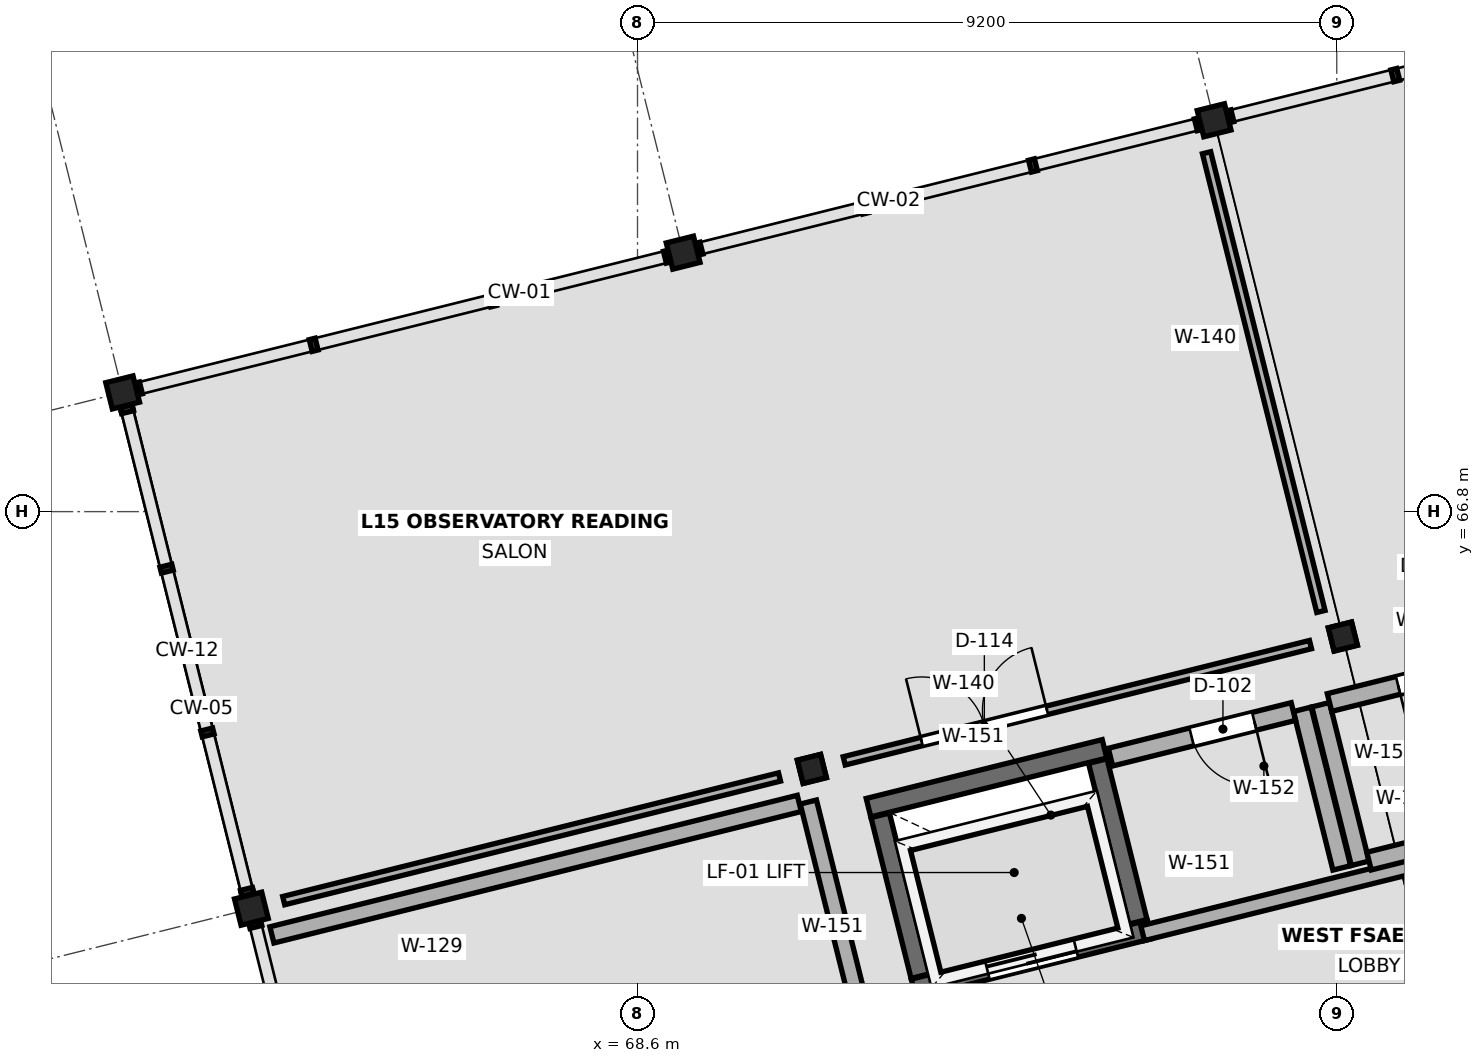
"""IFC4 building model, lengths in metres.
Left out: names, types, materials, properties, quantities, classifications, styles, units other than length and angle.
Written with IfcOpenShell. Run it as: python <this file> out.ifc"""

import sys

from ifc_helpers import new_model, si_unit, direction, frame, frame_2d, origin, origin_2d, place, context, subcontext, project, spatial, rectangle, i_section, extrude, element, fill, save


model = new_model("IFC4")
c1 = context("Model", 3, precision=1e-05, world=origin(), true_north=direction((0.0, 1.0)))
c2 = subcontext(c1, "Body", "Model", "MODEL_VIEW")
j1 = project(units=[si_unit("LENGTHUNIT", "METRE"), si_unit("PLANEANGLEUNIT", "RADIAN")], contexts=[c1])
p1 = place(None, origin())
s1 = spatial("IfcSite", under=j1, at=p1, CompositionType="ELEMENT")
p2 = place(p1, origin())
s2 = spatial("IfcBuilding", under=s1, at=p2, CompositionType="ELEMENT")
p3 = place(p2, frame((0.0, 0.0, 61.2)))
s3 = spatial("IfcBuildingStorey", under=s2, at=p3, CompositionType="ELEMENT", Elevation=61.2)
for number, where, z_axis, x_axis in (
    (1, (63.52, 61.576, 0.0), (0.0, 0.0, 1.0), (0.97, 0.242, 0.0)),
    (2, (61.826, 68.368, 0.0), (0.0, 0.0, 1.0), (0.97, 0.242, 0.0)),
    (3, (70.894, 63.415, 0.0), (0.0, 0.0, 1.0), (0.97, 0.242, 0.0)),
    (4, (69.2, 70.207, 0.0), (0.0, 0.0, 1.0), (0.97, 0.242, 0.0)),
    (5, (77.88, 65.157, 0.0), (0.0, 0.0, 1.0), (0.97, 0.242, 0.0)),
    (6, (76.187, 71.949, 0.0), (0.0, 0.0, 1.0), (0.97, 0.242, 0.0)),
):
    element("IfcColumn", number, at=place(p3, frame(where, z_axis=z_axis, x_axis=x_axis)), inside=s3, PredefinedType="COLUMN", context=c2, shape_type="SweptSolid", body=[
        extrude(rectangle(XDim=0.315, YDim=0.315, at=origin_2d()), origin(), (0.0, 0.0, 1.0), 4.2),
    ])
p4 = place(p3, frame((70.894, 63.415, 4.2), z_axis=(0.0, 0.0, 1.0), x_axis=(0.970295726276, 0.2419218956, 0.0)))
e7 = element("IfcColumn", 7, at=p4, inside=s3, PredefinedType="COLUMN", context=c2, shape_type="SweptSolid", body=[
    extrude(rectangle(XDim=0.315, YDim=0.315, at=origin_2d()), origin(), (0.0, 0.0, 1.0), 1.81),
])
p5 = place(p3, frame((77.88, 65.157, 4.2), z_axis=(0.0, 0.0, 1.0), x_axis=(0.970295726276, 0.2419218956, 0.0)))
e8 = element("IfcColumn", 8, at=p5, inside=s3, PredefinedType="COLUMN", context=c2, shape_type="SweptSolid", body=[
    extrude(rectangle(XDim=0.315, YDim=0.315, at=origin_2d()), origin(), (0.0, 0.0, 1.0), 3.804),
])
for number, where, z_axis, x_axis in (
    (9, (76.187, 71.949, 4.2), (0.0, 0.0, 1.0), (0.97, 0.242, 0.0)),
    (10, (69.2, 70.207, 4.2), (0.0, 0.0, 1.0), (0.97, 0.242, 0.0)),
    (11, (61.826, 68.368, 4.2), (0.0, 0.0, 1.0), (0.97, 0.242, 0.0)),
    (12, (63.52, 61.576, 4.2), (0.0, 0.0, 1.0), (0.97, 0.242, 0.0)),
):
    element("IfcColumn", number, at=place(p3, frame(where, z_axis=z_axis, x_axis=x_axis)), inside=s3, PredefinedType="COLUMN", context=c2, shape_type="SweptSolid", body=[
        extrude(i_section(OverallWidth=0.369, OverallDepth=0.356, WebThickness=0.011, FlangeThickness=0.018, at=origin_2d()), origin(), (0.0, 0.0, 1.0), 4.8),
    ])
p6 = place(p3, frame((74.744, 63.679, 0.0), z_axis=(0.0, 0.0, 1.0), x_axis=(-0.970294894235, -0.241925232711, 0.0)))
e13 = element("IfcWall", 13, at=p6, inside=s3, PredefinedType="SHEAR", context=c2, shape_type="SweptSolid", body=[
    extrude(rectangle(XDim=3.2, YDim=0.25, at=frame_2d((1.6, 0.0))), origin(), (0.0, 0.0, 1.0), 4.032),
])
for number, where, z_axis, x_axis in (
    (14, (71.793, 62.804, 0.0), (0.0, 0.0, 1.0), (0.242, -0.97, 0.0)),
    (15, (75.183, 61.403, 0.0), (0.0, 0.0, 1.0), (-0.242, 0.97, 0.0)),
):
    element("IfcWall", number, at=place(p3, frame(where, z_axis=z_axis, x_axis=x_axis)), inside=s3, PredefinedType="SHEAR", context=c2, shape_type="SweptSolid", body=[
        extrude(rectangle(XDim=2.18, YDim=0.25, at=frame_2d((1.09, 0.0))), origin(), (0.0, 0.0, 1.0), 4.032),
    ])
p7 = place(p3, frame((72.232, 60.528, 0.0), z_axis=(0.0, 0.0, 1.0), x_axis=(0.970290428474, 0.241943142934, 0.0)))
e16 = element("IfcWall", 16, at=p7, inside=s3, PredefinedType="SHEAR", context=c2, shape_type="SweptSolid", body=[
    extrude(rectangle(XDim=3.2, YDim=0.25, at=frame_2d((1.6, 0.0))), origin(), (0.0, 0.0, 1.0), 4.032),
])
p8 = place(p7, frame((1.0, 0.0, 0.0)))
e17 = element("IfcOpeningElement", 17, at=p8, cuts=e16, PredefinedType="OPENING", context=c2, shape_type="SweptSolid", body=[
    extrude(rectangle(XDim=1.2, YDim=2.2, at=frame_2d((0.6, 1.1))), frame((0.0, 0.137, 0.0), z_axis=(0.0, -1.0, 0.0), x_axis=(1.0, 0.0, 0.0)), (0.0, 0.0, 1.0), 0.274),
])
p9 = place(p3, frame((75.246, 61.253, 0.0), z_axis=(0.0, 0.0, 1.0), x_axis=(0.970292173201, 0.24193614576, 0.0)))
e18 = element("IfcWall", 18, at=p9, inside=s3, PredefinedType="STANDARD", context=c2, shape_type="SweptSolid", body=[
    extrude(rectangle(XDim=5.75, YDim=0.2, at=frame_2d((2.875, 0.0))), origin(), (0.0, 0.0, 1.0), 3.92),
])
p10 = place(p3, frame((77.866, 62.113, 0.0), z_axis=(0.0, 0.0, 1.0), x_axis=(-0.2418676095, 0.970309259708, 0.0)))
e19 = element("IfcWall", 19, at=p10, inside=s3, PredefinedType="STANDARD", context=c2, shape_type="SweptSolid", body=[
    extrude(rectangle(XDim=2.15, YDim=0.24, at=frame_2d((1.075, 0.0))), origin(), (0.0, 0.0, 1.0), 3.92),
])
p11 = place(p3, frame((77.229, 64.17, 0.0), z_axis=(0.0, 0.0, 1.0), x_axis=(-0.970310192441, -0.241863867589, 0.0)))
e20 = element("IfcWall", 20, at=p11, inside=s3, PredefinedType="STANDARD", context=c2, shape_type="SweptSolid", body=[
    extrude(rectangle(XDim=2.48, YDim=0.24, at=frame_2d((1.24, 0.0))), origin(), (0.0, 0.0, 1.0), 3.92),
])
p12 = place(p11, frame((0.53, 0.0, 0.0)))
e21 = element("IfcOpeningElement", 21, at=p12, cuts=e20, PredefinedType="OPENING", context=c2, shape_type="SweptSolid", body=[
    extrude(rectangle(XDim=0.85, YDim=2.1, at=frame_2d((0.425, 1.05))), frame((0.0, 0.132, 0.0), z_axis=(0.0, -1.0, 0.0), x_axis=(1.0, 0.0, 0.0)), (0.0, 0.0, 1.0), 0.264),
])
p13 = place(p3, frame((77.588, 64.26, 0.0), z_axis=(0.0, 0.0, 1.0), x_axis=(0.241974515127, -0.970282605239, 0.0)))
e22 = element("IfcWall", 22, at=p13, inside=s3, PredefinedType="STANDARD", context=c2, shape_type="SweptSolid", body=[
    extrude(rectangle(XDim=2.15, YDim=0.24, at=frame_2d((1.075, 0.0))), origin(), (0.0, 0.0, 1.0), 3.92),
])
p14 = place(p3, frame((78.225, 62.202, 0.0), z_axis=(0.0, 0.0, 1.0), x_axis=(0.970290077921, 0.241944548787, 0.0)))
e23 = element("IfcWall", 23, at=p14, inside=s3, PredefinedType="STANDARD", context=c2, shape_type="SweptSolid", body=[
    extrude(rectangle(XDim=2.43, YDim=0.24, at=frame_2d((1.215, 0.0))), origin(), (0.0, 0.0, 1.0), 3.92),
])
p15 = place(p3, frame((79.946, 64.847, 0.0), z_axis=(0.0, 0.0, 1.0), x_axis=(-0.970297720672, -0.241913896375, 0.0)))
e24 = element("IfcWall", 24, at=p15, inside=s3, PredefinedType="STANDARD", context=c2, shape_type="SweptSolid", body=[
    extrude(rectangle(XDim=2.31, YDim=0.24, at=frame_2d((1.155, 0.0))), origin(), (0.0, 0.0, 1.0), 3.92),
])
p16 = place(p15, frame((0.53, 0.0, 0.0)))
e25 = element("IfcOpeningElement", 25, at=p16, cuts=e24, PredefinedType="OPENING", context=c2, shape_type="SweptSolid", body=[
    extrude(rectangle(XDim=0.85, YDim=2.1, at=frame_2d((0.425, 1.05))), frame((0.0, 0.132, 0.0), z_axis=(0.0, -1.0, 0.0), x_axis=(1.0, 0.0, 0.0)), (0.0, 0.0, 1.0), 0.264),
])
p17 = place(p3, frame((70.848, 62.979, 0.0), z_axis=(0.0, 0.0, 1.0), x_axis=(0.241922822951, -0.970295495061, 0.0)))
e26 = element("IfcWall", 26, at=p17, inside=s3, PredefinedType="PARTITIONING", context=c2, shape_type="SweptSolid", body=[
    extrude(rectangle(XDim=6.375, YDim=0.22, at=frame_2d((3.188, 0.0))), origin(), (0.0, 0.0, 1.0), 3.92),
])
p18 = place(p3, frame((70.729, 62.961, 0.0), z_axis=(0.0, 0.0, 1.0), x_axis=(-0.970292920146, -0.241933150092, 0.0)))
e27 = element("IfcWall", 27, at=p18, inside=s3, PredefinedType="PARTITIONING", context=c2, shape_type="SweptSolid", body=[
    extrude(rectangle(XDim=7.152, YDim=0.22, at=frame_2d((3.576, 0.0))), origin(), (0.0, 0.0, 1.0), 3.92),
])
p19 = place(p3, frame((63.945, 61.682, 0.0), z_axis=(0.0, 0.0, 1.0), x_axis=(0.970296103345, 0.241920383252, 0.0)))
e28 = element("IfcWall", 28, at=p19, inside=s3, PredefinedType="PARTITIONING", context=c2, shape_type="SweptSolid", body=[
    extrude(rectangle(XDim=6.723, YDim=0.112, at=frame_2d((3.362, 0.0))), origin(), (0.0, 0.0, 1.0), 3.244),
])
p20 = place(p3, frame((71.319, 63.521, 0.0), z_axis=(0.0, 0.0, 1.0), x_axis=(0.970301279298, 0.241899622555, 0.0)))
e29 = element("IfcWall", 29, at=p20, inside=s3, PredefinedType="PARTITIONING", context=c2, shape_type="SweptSolid", body=[
    extrude(rectangle(XDim=6.323, YDim=0.112, at=frame_2d((3.162, 0.0))), origin(), (0.0, 0.0, 1.0), 3.92),
])
p21 = place(p20, frame((1.051, 0.0, 0.0)))
e30 = element("IfcOpeningElement", 30, at=p21, cuts=e29, PredefinedType="OPENING", context=c2, shape_type="SweptSolid", body=[
    extrude(rectangle(XDim=1.7, YDim=2.4, at=frame_2d((0.85, 1.2))), frame((0.0, 0.068, 0.0), z_axis=(0.0, -1.0, 0.0), x_axis=(1.0, 0.0, 0.0)), (0.0, 0.0, 1.0), 0.136),
])
p22 = place(p3, frame((77.592, 65.487, 0.0), z_axis=(0.0, 0.0, 1.0), x_axis=(-0.241925976618, 0.970294708755, 0.0)))
e31 = element("IfcWall", 31, at=p22, inside=s3, PredefinedType="PARTITIONING", context=c2, shape_type="SweptSolid", body=[
    extrude(rectangle(XDim=6.219, YDim=0.112, at=frame_2d((3.11, 0.0))), origin(), (0.0, 0.0, 1.0), 3.92),
])
p23 = place(p8, origin())
e32 = element("IfcDoor", 32, at=p23, inside=s3, OperationType="DOUBLE_DOOR_SLIDING", PredefinedType="DOOR", context=c2, shape_type="SweptSolid", body=[
    extrude(rectangle(XDim=1.2, YDim=2.2, at=frame_2d((0.6, 1.1))), frame((0.0, 0.025, 0.0), z_axis=(0.0, -1.0, 0.0), x_axis=(1.0, 0.0, 0.0)), (0.0, 0.0, 1.0), 0.05),
])
fill(e17, e32)
p24 = place(p12, origin())
e33 = element("IfcDoor", 33, at=p24, inside=s3, OperationType="SINGLE_SWING_LEFT", PredefinedType="DOOR", context=c2, shape_type="SweptSolid", body=[
    extrude(rectangle(XDim=0.85, YDim=2.1, at=frame_2d((0.425, 1.05))), frame((0.0, 0.025, 0.0), z_axis=(0.0, -1.0, 0.0), x_axis=(1.0, 0.0, 0.0)), (0.0, 0.0, 1.0), 0.05),
])
fill(e21, e33)
p25 = place(p16, origin())
e34 = element("IfcDoor", 34, at=p25, inside=s3, OperationType="SINGLE_SWING_RIGHT", PredefinedType="DOOR", context=c2, shape_type="SweptSolid", body=[
    extrude(rectangle(XDim=0.85, YDim=2.1, at=frame_2d((0.425, 1.05))), frame((0.0, 0.025, 0.0), z_axis=(0.0, -1.0, 0.0), x_axis=(1.0, 0.0, 0.0)), (0.0, 0.0, 1.0), 0.05),
])
fill(e25, e34)
p26 = place(p21, origin())
e35 = element("IfcDoor", 35, at=p26, inside=s3, OperationType="DOUBLE_DOOR_SINGLE_SWING", PredefinedType="DOOR", context=c2, shape_type="SweptSolid", body=[
    extrude(rectangle(XDim=1.7, YDim=2.4, at=frame_2d((0.85, 1.2))), frame((0.0, 0.025, 0.0), z_axis=(0.0, -1.0, 0.0), x_axis=(1.0, 0.0, 0.0)), (0.0, 0.0, 1.0), 0.05),
])
fill(e30, e35)
save(model, sys.argv[1])
